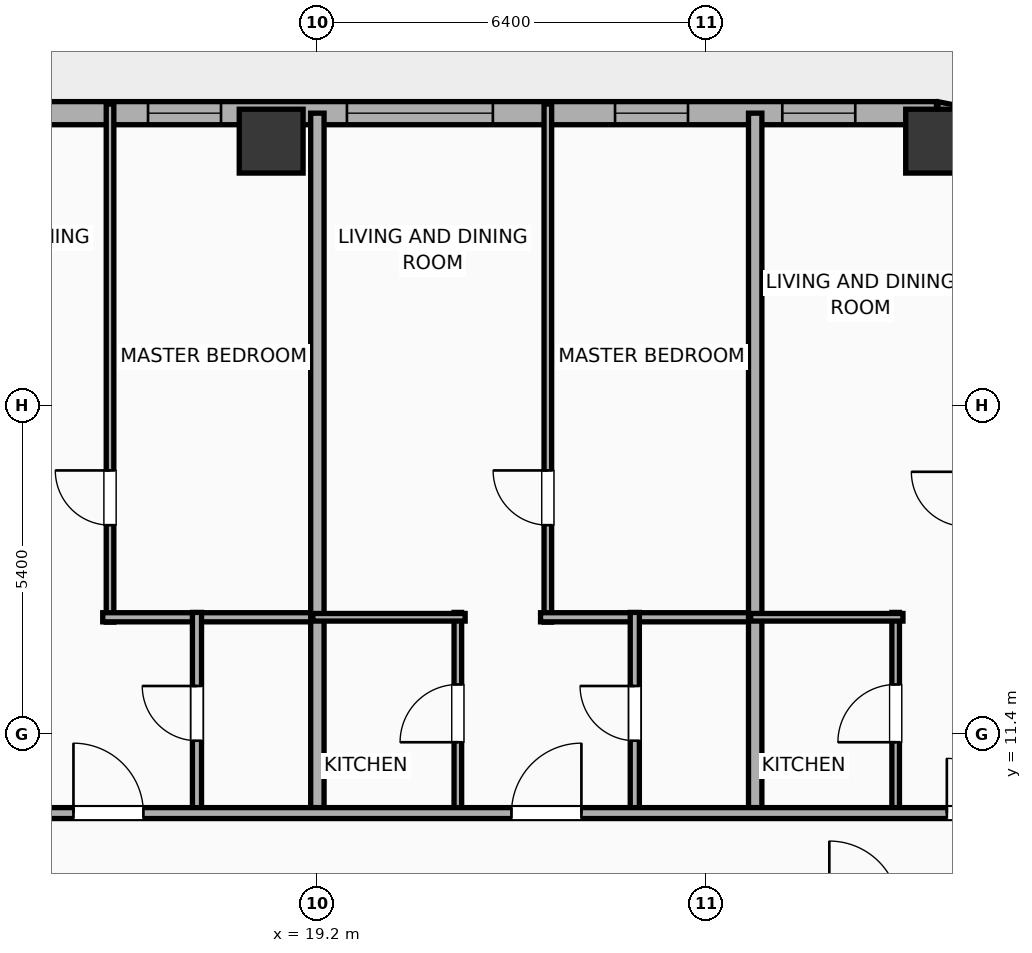
"""IFC4 building model, lengths in metres.
Left out: names, types, materials, properties, quantities, classifications, styles, units other than length and angle.
Written with IfcOpenShell. Run it as: python <this file> out.ifc"""

import sys

from ifc_helpers import new_model, si_unit, direction, frame, frame_2d, origin, origin_2d, place, context, subcontext, project, spatial, rectangle, hollow_rectangle, extrude, element, fill, save


model = new_model("IFC4")
c1 = context("Model", 3, precision=1e-05, world=origin(), true_north=direction((0.0, 1.0)))
c2 = subcontext(c1, "Body", "Model", "MODEL_VIEW")
j1 = project(units=[si_unit("LENGTHUNIT", "METRE"), si_unit("PLANEANGLEUNIT", "RADIAN")], contexts=[c1])
p1 = place(None, origin())
s1 = spatial("IfcSite", under=j1, at=p1, CompositionType="ELEMENT")
p2 = place(p1, origin())
s2 = spatial("IfcBuilding", under=s1, at=p2, CompositionType="ELEMENT")
p3 = place(p2, frame((0.0, 0.0, 113.1)))
s3 = spatial("IfcBuildingStorey", under=s2, at=p3, CompositionType="ELEMENT", Elevation=113.1)
for number, where, z_axis, x_axis in (
    (1, (29.4, 21.15, 0.0), (0.0, 0.0, 1.0), (1.0, 0.0, 0.0)),
    (2, (18.44, 21.15, 0.0), (0.0, 0.0, 1.0), (1.0, 0.0, 0.0)),
):
    element("IfcColumn", number, at=place(p3, frame(where, z_axis=z_axis, x_axis=x_axis)), inside=s3, PredefinedType="COLUMN", context=c2, shape_type="SweptSolid", body=[
        extrude(hollow_rectangle(XDim=1.05, YDim=1.05, WallThickness=0.036, at=origin_2d()), origin(), (0.0, 0.0, 1.0), 3.9),
    ])
p4 = place(p3, frame((-25.381, 21.61, 0.0), z_axis=(0.0, 0.0, 1.0), x_axis=(1.0, 0.0, 0.0)))
e3 = element("IfcWall", 3, at=p4, inside=s3, PredefinedType="ELEMENTEDWALL", context=c2, shape_type="SweptSolid", body=[
    extrude(rectangle(XDim=54.763, YDim=0.38, at=frame_2d((27.381, 0.0))), origin(), (0.0, 0.0, 1.0), 3.65),
])
p5 = place(p4, frame((5.645, 0.0, 0.75)))
e4 = element("IfcOpeningElement", 4, at=p5, cuts=e3, PredefinedType="OPENING", context=c2, shape_type="SweptSolid", body=[
    extrude(rectangle(XDim=2.4, YDim=2.1, at=frame_2d((1.2, 1.05))), frame((0.0, 0.2, 0.0), z_axis=(0.0, -1.0, 0.0), x_axis=(1.0, 0.0, 0.0)), (0.0, 0.0, 1.0), 0.4),
])
p6 = place(p4, frame((34.677, 0.0, 0.75)))
e5 = element("IfcOpeningElement", 5, at=p6, cuts=e3, PredefinedType="OPENING", context=c2, shape_type="SweptSolid", body=[
    extrude(rectangle(XDim=2.4, YDim=2.1, at=frame_2d((1.2, 1.05))), frame((0.0, 0.2, 0.0), z_axis=(0.0, -1.0, 0.0), x_axis=(1.0, 0.0, 0.0)), (0.0, 0.0, 1.0), 0.4),
])
p7 = place(p4, frame((45.067, 0.0, 0.75)))
e6 = element("IfcOpeningElement", 6, at=p7, cuts=e3, PredefinedType="OPENING", context=c2, shape_type="SweptSolid", body=[
    extrude(rectangle(XDim=2.4, YDim=2.1, at=frame_2d((1.2, 1.05))), frame((0.0, 0.2, 0.0), z_axis=(0.0, -1.0, 0.0), x_axis=(1.0, 0.0, 0.0)), (0.0, 0.0, 1.0), 0.4),
])
p8 = place(p4, frame((2.938, 0.0, 0.75)))
e7 = element("IfcOpeningElement", 7, at=p8, cuts=e3, PredefinedType="OPENING", context=c2, shape_type="SweptSolid", body=[
    extrude(rectangle(XDim=1.2, YDim=2.05, at=frame_2d((0.6, 1.025))), frame((0.0, 0.2, 0.0), z_axis=(0.0, -1.0, 0.0), x_axis=(1.0, 0.0, 0.0)), (0.0, 0.0, 1.0), 0.4),
])
p9 = place(p4, frame((8.916, 0.0, 0.75)))
e8 = element("IfcOpeningElement", 8, at=p9, cuts=e3, PredefinedType="OPENING", context=c2, shape_type="SweptSolid", body=[
    extrude(rectangle(XDim=1.2, YDim=2.05, at=frame_2d((0.6, 1.025))), frame((0.0, 0.2, 0.0), z_axis=(0.0, -1.0, 0.0), x_axis=(1.0, 0.0, 0.0)), (0.0, 0.0, 1.0), 0.4),
])
p10 = place(p4, frame((13.476, 0.0, 0.75)))
e9 = element("IfcOpeningElement", 9, at=p10, cuts=e3, PredefinedType="OPENING", context=c2, shape_type="SweptSolid", body=[
    extrude(rectangle(XDim=1.2, YDim=2.05, at=frame_2d((0.6, 1.025))), frame((0.0, 0.2, 0.0), z_axis=(0.0, -1.0, 0.0), x_axis=(1.0, 0.0, 0.0)), (0.0, 0.0, 1.0), 0.4),
])
p11 = place(p4, frame((17.076, 0.0, 0.75)))
e10 = element("IfcOpeningElement", 10, at=p11, cuts=e3, PredefinedType="OPENING", context=c2, shape_type="SweptSolid", body=[
    extrude(rectangle(XDim=1.2, YDim=2.05, at=frame_2d((0.6, 1.025))), frame((0.0, 0.2, 0.0), z_axis=(0.0, -1.0, 0.0), x_axis=(1.0, 0.0, 0.0)), (0.0, 0.0, 1.0), 0.4),
])
p12 = place(p4, frame((19.956, 0.0, 0.75)))
e11 = element("IfcOpeningElement", 11, at=p12, cuts=e3, PredefinedType="OPENING", context=c2, shape_type="SweptSolid", body=[
    extrude(rectangle(XDim=1.2, YDim=2.05, at=frame_2d((0.6, 1.025))), frame((0.0, 0.2, 0.0), z_axis=(0.0, -1.0, 0.0), x_axis=(1.0, 0.0, 0.0)), (0.0, 0.0, 1.0), 0.4),
])
p13 = place(p4, frame((24.276, 0.0, 0.75)))
e12 = element("IfcOpeningElement", 12, at=p13, cuts=e3, PredefinedType="OPENING", context=c2, shape_type="SweptSolid", body=[
    extrude(rectangle(XDim=1.2, YDim=2.05, at=frame_2d((0.6, 1.025))), frame((0.0, 0.2, 0.0), z_axis=(0.0, -1.0, 0.0), x_axis=(1.0, 0.0, 0.0)), (0.0, 0.0, 1.0), 0.4),
])
p14 = place(p4, frame((27.876, 0.0, 0.75)))
e13 = element("IfcOpeningElement", 13, at=p14, cuts=e3, PredefinedType="OPENING", context=c2, shape_type="SweptSolid", body=[
    extrude(rectangle(XDim=1.2, YDim=2.05, at=frame_2d((0.6, 1.025))), frame((0.0, 0.2, 0.0), z_axis=(0.0, -1.0, 0.0), x_axis=(1.0, 0.0, 0.0)), (0.0, 0.0, 1.0), 0.4),
])
p15 = place(p4, frame((30.876, 0.0, 0.75)))
e14 = element("IfcOpeningElement", 14, at=p15, cuts=e3, PredefinedType="OPENING", context=c2, shape_type="SweptSolid", body=[
    extrude(rectangle(XDim=1.2, YDim=2.05, at=frame_2d((0.6, 1.025))), frame((0.0, 0.2, 0.0), z_axis=(0.0, -1.0, 0.0), x_axis=(1.0, 0.0, 0.0)), (0.0, 0.0, 1.0), 0.4),
])
p16 = place(p4, frame((38.676, 0.0, 0.75)))
e15 = element("IfcOpeningElement", 15, at=p16, cuts=e3, PredefinedType="OPENING", context=c2, shape_type="SweptSolid", body=[
    extrude(rectangle(XDim=1.2, YDim=2.05, at=frame_2d((0.6, 1.025))), frame((0.0, 0.2, 0.0), z_axis=(0.0, -1.0, 0.0), x_axis=(1.0, 0.0, 0.0)), (0.0, 0.0, 1.0), 0.4),
])
p17 = place(p4, frame((41.796, 0.0, 0.75)))
e16 = element("IfcOpeningElement", 16, at=p17, cuts=e3, PredefinedType="OPENING", context=c2, shape_type="SweptSolid", body=[
    extrude(rectangle(XDim=1.2, YDim=2.05, at=frame_2d((0.6, 1.025))), frame((0.0, 0.2, 0.0), z_axis=(0.0, -1.0, 0.0), x_axis=(1.0, 0.0, 0.0)), (0.0, 0.0, 1.0), 0.4),
])
p18 = place(p4, frame((49.476, 0.0, 0.75)))
e17 = element("IfcOpeningElement", 17, at=p18, cuts=e3, PredefinedType="OPENING", context=c2, shape_type="SweptSolid", body=[
    extrude(rectangle(XDim=1.2, YDim=2.05, at=frame_2d((0.6, 1.025))), frame((0.0, 0.2, 0.0), z_axis=(0.0, -1.0, 0.0), x_axis=(1.0, 0.0, 0.0)), (0.0, 0.0, 1.0), 0.4),
])
p19 = place(p4, frame((52.227, 0.0, 0.75)))
e18 = element("IfcOpeningElement", 18, at=p19, cuts=e3, PredefinedType="OPENING", context=c2, shape_type="SweptSolid", body=[
    extrude(rectangle(XDim=1.2, YDim=2.05, at=frame_2d((0.6, 1.025))), frame((0.0, 0.2, 0.0), z_axis=(0.0, -1.0, 0.0), x_axis=(1.0, 0.0, 0.0)), (0.0, 0.0, 1.0), 0.4),
])
p20 = place(p3, frame((29.381, 21.61, 0.0), z_axis=(0.0, 0.0, 1.0), x_axis=(0.980755066645, -0.195242155415, 0.0)))
e19 = element("IfcWall", 19, at=p20, inside=s3, PredefinedType="ELEMENTEDWALL", context=c2, shape_type="SweptSolid", body=[
    extrude(rectangle(XDim=1.504, YDim=0.38, at=frame_2d((0.752, 0.0))), origin(), (0.0, 0.0, 1.0), 3.65),
])
p21 = place(p20, frame((0.732, 0.0, 0.75)))
e20 = element("IfcOpeningElement", 20, at=p21, cuts=e19, PredefinedType="OPENING", context=c2, shape_type="SweptSolid", body=[
    extrude(rectangle(XDim=0.52, YDim=2.05, at=frame_2d((0.26, 1.025))), frame((0.0, 0.2, 0.0), z_axis=(0.0, -1.0, 0.0), x_axis=(1.0, 0.0, 0.0)), (0.0, 0.0, 1.0), 0.4),
])
p22 = place(p3, frame((15.79, 13.24, 0.0), z_axis=(0.0, 0.0, 1.0), x_axis=(0.0, 1.0, 0.0)))
e21 = element("IfcWall", 21, at=p22, inside=s3, PredefinedType="PARTITIONING", context=c2, shape_type="SweptSolid", body=[
    extrude(rectangle(XDim=8.52, YDim=0.125, at=frame_2d((4.26, 0.0))), origin(), (0.0, 0.0, 1.0), 3.65),
])
p23 = place(p22, frame((1.595, 0.0, 0.0)))
e22 = element("IfcOpeningElement", 22, at=p23, cuts=e21, PredefinedType="OPENING", context=c2, shape_type="SweptSolid", body=[
    extrude(rectangle(XDim=0.9, YDim=2.05, at=frame_2d((0.45, 1.025))), frame((0.0, 0.073, 0.0), z_axis=(0.0, -1.0, 0.0), x_axis=(1.0, 0.0, 0.0)), (0.0, 0.0, 1.0), 0.145),
])
p24 = place(p3, frame((15.67, 13.32, 0.0), z_axis=(0.0, 0.0, 1.0), x_axis=(1.0, 0.0, 0.0)))
e23 = element("IfcWall", 23, at=p24, inside=s3, PredefinedType="PLUMBINGWALL", context=c2, shape_type="SweptSolid", body=[
    extrude(rectangle(XDim=3.605, YDim=0.15, at=frame_2d((1.802, 0.0))), origin(), (0.0, 0.0, 1.0), 3.65),
])
p25 = place(p3, frame((17.22, 10.08, 0.0), z_axis=(0.0, 0.0, 1.0), x_axis=(0.0, 1.0, 0.0)))
e24 = element("IfcWall", 24, at=p25, inside=s3, PredefinedType="PLUMBINGWALL", context=c2, shape_type="SweptSolid", body=[
    extrude(rectangle(XDim=3.32, YDim=0.15, at=frame_2d((1.66, 0.0))), origin(), (0.0, 0.0, 1.0), 3.65),
])
p26 = place(p25, frame((1.21, 0.0, 0.0)))
e25 = element("IfcOpeningElement", 25, at=p26, cuts=e24, PredefinedType="OPENING", context=c2, shape_type="SweptSolid", body=[
    extrude(rectangle(XDim=0.9, YDim=2.05, at=frame_2d((0.45, 1.025))), frame((0.0, 0.085, 0.0), z_axis=(0.0, -1.0, 0.0), x_axis=(1.0, 0.0, 0.0)), (0.0, 0.0, 1.0), 0.17),
])
p27 = place(p3, frame((19.2, 10.02, 0.0), z_axis=(0.0, 0.0, 1.0), x_axis=(0.0, 1.0, 0.0)))
e26 = element("IfcWall", 26, at=p27, inside=s3, PredefinedType="PARTITIONING", context=c2, shape_type="SweptSolid", body=[
    extrude(rectangle(XDim=11.59, YDim=0.22, at=frame_2d((5.795, 0.0))), origin(), (0.0, 0.0, 1.0), 3.04),
])
p28 = place(p3, frame((22.99, 13.24, 0.0), z_axis=(0.0, 0.0, 1.0), x_axis=(0.0, 1.0, 0.0)))
e27 = element("IfcWall", 27, at=p28, inside=s3, PredefinedType="PARTITIONING", context=c2, shape_type="SweptSolid", body=[
    extrude(rectangle(XDim=8.52, YDim=0.125, at=frame_2d((4.26, 0.0))), origin(), (0.0, 0.0, 1.0), 3.65),
])
p29 = place(p28, frame((1.595, 0.0, 0.0)))
e28 = element("IfcOpeningElement", 28, at=p29, cuts=e27, PredefinedType="OPENING", context=c2, shape_type="SweptSolid", body=[
    extrude(rectangle(XDim=0.9, YDim=2.05, at=frame_2d((0.45, 1.025))), frame((0.0, 0.073, 0.0), z_axis=(0.0, -1.0, 0.0), x_axis=(1.0, 0.0, 0.0)), (0.0, 0.0, 1.0), 0.145),
])
p30 = place(p3, frame((22.87, 13.32, 0.0), z_axis=(0.0, 0.0, 1.0), x_axis=(1.0, 0.0, 0.0)))
e29 = element("IfcWall", 29, at=p30, inside=s3, PredefinedType="PLUMBINGWALL", context=c2, shape_type="SweptSolid", body=[
    extrude(rectangle(XDim=3.605, YDim=0.15, at=frame_2d((1.802, 0.0))), origin(), (0.0, 0.0, 1.0), 3.65),
])
p31 = place(p3, frame((21.51, 10.08, 0.0), z_axis=(0.0, 0.0, 1.0), x_axis=(0.0, 1.0, 0.0)))
e30 = element("IfcWall", 30, at=p31, inside=s3, PredefinedType="PARTITIONING", context=c2, shape_type="SweptSolid", body=[
    extrude(rectangle(XDim=3.32, YDim=0.125, at=frame_2d((1.66, 0.0))), origin(), (0.0, 0.0, 1.0), 3.65),
])
p32 = place(p31, frame((1.185, 0.0, 0.0)))
e31 = element("IfcOpeningElement", 31, at=p32, cuts=e30, PredefinedType="OPENING", context=c2, shape_type="SweptSolid", body=[
    extrude(rectangle(XDim=0.95, YDim=2.05, at=frame_2d((0.475, 1.025))), frame((0.0, 0.073, 0.0), z_axis=(0.0, -1.0, 0.0), x_axis=(1.0, 0.0, 0.0)), (0.0, 0.0, 1.0), 0.145),
])
p33 = place(p3, frame((19.125, 13.32, 0.0), z_axis=(0.0, 0.0, 1.0), x_axis=(1.0, 0.0, 0.0)))
e32 = element("IfcWall", 32, at=p33, inside=s3, PredefinedType="PARTITIONING", context=c2, shape_type="SweptSolid", body=[
    extrude(rectangle(XDim=2.505, YDim=0.125, at=frame_2d((1.252, 0.0))), origin(), (0.0, 0.0, 1.0), 3.65),
])
p34 = place(p3, frame((24.42, 10.08, 0.0), z_axis=(0.0, 0.0, 1.0), x_axis=(0.0, 1.0, 0.0)))
e33 = element("IfcWall", 33, at=p34, inside=s3, PredefinedType="PLUMBINGWALL", context=c2, shape_type="SweptSolid", body=[
    extrude(rectangle(XDim=3.32, YDim=0.15, at=frame_2d((1.66, 0.0))), origin(), (0.0, 0.0, 1.0), 3.65),
])
p35 = place(p34, frame((1.21, 0.0, 0.0)))
e34 = element("IfcOpeningElement", 34, at=p35, cuts=e33, PredefinedType="OPENING", context=c2, shape_type="SweptSolid", body=[
    extrude(rectangle(XDim=0.9, YDim=2.05, at=frame_2d((0.45, 1.025))), frame((0.0, 0.085, 0.0), z_axis=(0.0, -1.0, 0.0), x_axis=(1.0, 0.0, 0.0)), (0.0, 0.0, 1.0), 0.17),
])
p36 = place(p3, frame((26.4, 10.02, 0.0), z_axis=(0.0, 0.0, 1.0), x_axis=(0.0, 1.0, 0.0)))
e35 = element("IfcWall", 35, at=p36, inside=s3, PredefinedType="PARTITIONING", context=c2, shape_type="SweptSolid", body=[
    extrude(rectangle(XDim=11.59, YDim=0.22, at=frame_2d((5.795, 0.0))), origin(), (0.0, 0.0, 1.0), 3.65),
])
p37 = place(p3, frame((28.71, 10.08, 0.0), z_axis=(0.0, 0.0, 1.0), x_axis=(0.0, 1.0, 0.0)))
e36 = element("IfcWall", 36, at=p37, inside=s3, PredefinedType="PARTITIONING", context=c2, shape_type="SweptSolid", body=[
    extrude(rectangle(XDim=3.32, YDim=0.125, at=frame_2d((1.66, 0.0))), origin(), (0.0, 0.0, 1.0), 3.65),
])
p38 = place(p37, frame((1.185, 0.0, 0.0)))
e37 = element("IfcOpeningElement", 37, at=p38, cuts=e36, PredefinedType="OPENING", context=c2, shape_type="SweptSolid", body=[
    extrude(rectangle(XDim=0.95, YDim=2.05, at=frame_2d((0.475, 1.025))), frame((0.0, 0.073, 0.0), z_axis=(0.0, -1.0, 0.0), x_axis=(1.0, 0.0, 0.0)), (0.0, 0.0, 1.0), 0.145),
])
p39 = place(p3, frame((26.325, 13.32, 0.0), z_axis=(0.0, 0.0, 1.0), x_axis=(1.0, 0.0, 0.0)))
e38 = element("IfcWall", 38, at=p39, inside=s3, PredefinedType="PARTITIONING", context=c2, shape_type="SweptSolid", body=[
    extrude(rectangle(XDim=2.505, YDim=0.125, at=frame_2d((1.252, 0.0))), origin(), (0.0, 0.0, 1.0), 3.65),
])
p40 = place(p3, frame((-29.21, 10.1, 0.0), z_axis=(0.0, 0.0, 1.0), x_axis=(1.0, 0.0, 0.0)))
e39 = element("IfcWall", 39, at=p40, inside=s3, PredefinedType="PARTITIONING", context=c2, shape_type="SweptSolid", body=[
    extrude(rectangle(XDim=62.42, YDim=0.18, at=frame_2d((31.21, 0.0))), origin(), (0.0, 0.0, 1.0), 3.65),
])
p41 = place(p40, frame((2.74, 0.0, 0.0)))
e40 = element("IfcOpeningElement", 40, at=p41, cuts=e39, PredefinedType="OPENING", context=c2, shape_type="SweptSolid", body=[
    extrude(rectangle(XDim=0.9, YDim=2.05, at=frame_2d((0.45, 1.025))), frame((0.0, 0.1, 0.0), z_axis=(0.0, -1.0, 0.0), x_axis=(1.0, 0.0, 0.0)), (0.0, 0.0, 1.0), 0.2),
])
p42 = place(p40, frame((9.868, 0.0, 0.0)))
e41 = element("IfcOpeningElement", 41, at=p42, cuts=e39, PredefinedType="OPENING", context=c2, shape_type="SweptSolid", body=[
    extrude(rectangle(XDim=1.15, YDim=2.05, at=frame_2d((0.575, 1.025))), frame((0.0, 0.1, 0.0), z_axis=(0.0, -1.0, 0.0), x_axis=(1.0, 0.0, 0.0)), (0.0, 0.0, 1.0), 0.2),
])
p43 = place(p40, frame((15.598, 0.0, 0.0)))
e42 = element("IfcOpeningElement", 42, at=p43, cuts=e39, PredefinedType="OPENING", context=c2, shape_type="SweptSolid", body=[
    extrude(rectangle(XDim=1.15, YDim=2.05, at=frame_2d((0.575, 1.025))), frame((0.0, 0.1, 0.0), z_axis=(0.0, -1.0, 0.0), x_axis=(1.0, 0.0, 0.0)), (0.0, 0.0, 1.0), 0.2),
])
p44 = place(p40, frame((22.801, 0.0, 0.0)))
e43 = element("IfcOpeningElement", 43, at=p44, cuts=e39, PredefinedType="OPENING", context=c2, shape_type="SweptSolid", body=[
    extrude(rectangle(XDim=1.15, YDim=2.05, at=frame_2d((0.575, 1.025))), frame((0.0, 0.1, 0.0), z_axis=(0.0, -1.0, 0.0), x_axis=(1.0, 0.0, 0.0)), (0.0, 0.0, 1.0), 0.2),
])
p45 = place(p40, frame((29.998, 0.0, 0.0)))
e44 = element("IfcOpeningElement", 44, at=p45, cuts=e39, PredefinedType="OPENING", context=c2, shape_type="SweptSolid", body=[
    extrude(rectangle(XDim=1.15, YDim=2.05, at=frame_2d((0.575, 1.025))), frame((0.0, 0.1, 0.0), z_axis=(0.0, -1.0, 0.0), x_axis=(1.0, 0.0, 0.0)), (0.0, 0.0, 1.0), 0.2),
])
p46 = place(p40, frame((37.202, 0.0, 0.0)))
e45 = element("IfcOpeningElement", 45, at=p46, cuts=e39, PredefinedType="OPENING", context=c2, shape_type="SweptSolid", body=[
    extrude(rectangle(XDim=1.15, YDim=2.05, at=frame_2d((0.575, 1.025))), frame((0.0, 0.1, 0.0), z_axis=(0.0, -1.0, 0.0), x_axis=(1.0, 0.0, 0.0)), (0.0, 0.0, 1.0), 0.2),
])
p47 = place(p40, frame((44.399, 0.0, 0.0)))
e46 = element("IfcOpeningElement", 46, at=p47, cuts=e39, PredefinedType="OPENING", context=c2, shape_type="SweptSolid", body=[
    extrude(rectangle(XDim=1.15, YDim=2.05, at=frame_2d((0.575, 1.025))), frame((0.0, 0.1, 0.0), z_axis=(0.0, -1.0, 0.0), x_axis=(1.0, 0.0, 0.0)), (0.0, 0.0, 1.0), 0.2),
])
p48 = place(p40, frame((51.602, 0.0, 0.0)))
e47 = element("IfcOpeningElement", 47, at=p48, cuts=e39, PredefinedType="OPENING", context=c2, shape_type="SweptSolid", body=[
    extrude(rectangle(XDim=1.15, YDim=2.05, at=frame_2d((0.575, 1.025))), frame((0.0, 0.1, 0.0), z_axis=(0.0, -1.0, 0.0), x_axis=(1.0, 0.0, 0.0)), (0.0, 0.0, 1.0), 0.2),
])
p49 = place(p40, frame((58.762, 0.0, 0.0)))
e48 = element("IfcOpeningElement", 48, at=p49, cuts=e39, PredefinedType="OPENING", context=c2, shape_type="SweptSolid", body=[
    extrude(rectangle(XDim=0.9, YDim=2.05, at=frame_2d((0.45, 1.025))), frame((0.0, 0.1, 0.0), z_axis=(0.0, -1.0, 0.0), x_axis=(1.0, 0.0, 0.0)), (0.0, 0.0, 1.0), 0.2),
])
p50 = place(p7, origin())
e49 = element("IfcWindow", 49, at=p50, inside=s3, PartitioningType="SINGLE_PANEL", PredefinedType="WINDOW", context=c2, shape_type="SweptSolid", body=[
    extrude(rectangle(XDim=2.4, YDim=2.1, at=frame_2d((1.2, 1.05))), frame((0.0, 0.03, 0.0), z_axis=(0.0, -1.0, 0.0), x_axis=(1.0, 0.0, 0.0)), (0.0, 0.0, 1.0), 0.06),
])
fill(e6, e49)
p51 = place(p17, origin())
e50 = element("IfcWindow", 50, at=p51, inside=s3, PartitioningType="SINGLE_PANEL", PredefinedType="WINDOW", context=c2, shape_type="SweptSolid", body=[
    extrude(rectangle(XDim=1.2, YDim=2.05, at=frame_2d((0.6, 1.025))), frame((0.0, 0.03, 0.0), z_axis=(0.0, -1.0, 0.0), x_axis=(1.0, 0.0, 0.0)), (0.0, 0.0, 1.0), 0.06),
])
fill(e16, e50)
p52 = place(p18, origin())
e51 = element("IfcWindow", 51, at=p52, inside=s3, PartitioningType="SINGLE_PANEL", PredefinedType="WINDOW", context=c2, shape_type="SweptSolid", body=[
    extrude(rectangle(XDim=1.2, YDim=2.05, at=frame_2d((0.6, 1.025))), frame((0.0, 0.03, 0.0), z_axis=(0.0, -1.0, 0.0), x_axis=(1.0, 0.0, 0.0)), (0.0, 0.0, 1.0), 0.06),
])
fill(e17, e51)
p53 = place(p19, origin())
e52 = element("IfcWindow", 52, at=p53, inside=s3, PartitioningType="SINGLE_PANEL", PredefinedType="WINDOW", context=c2, shape_type="SweptSolid", body=[
    extrude(rectangle(XDim=1.2, YDim=2.05, at=frame_2d((0.6, 1.025))), frame((0.0, 0.03, 0.0), z_axis=(0.0, -1.0, 0.0), x_axis=(1.0, 0.0, 0.0)), (0.0, 0.0, 1.0), 0.06),
])
fill(e18, e52)
p54 = place(p23, origin())
e53 = element("IfcDoor", 53, at=p54, inside=s3, OperationType="SINGLE_SWING_RIGHT", PredefinedType="DOOR", context=c2, shape_type="SweptSolid", body=[
    extrude(rectangle(XDim=0.9, YDim=2.05, at=frame_2d((0.45, 1.025))), frame((0.0, 0.025, 0.0), z_axis=(0.0, -1.0, 0.0), x_axis=(1.0, 0.0, 0.0)), (0.0, 0.0, 1.0), 0.05),
])
fill(e22, e53)
p55 = place(p26, origin())
e54 = element("IfcDoor", 54, at=p55, inside=s3, OperationType="SINGLE_SWING_RIGHT", PredefinedType="DOOR", context=c2, shape_type="SweptSolid", body=[
    extrude(rectangle(XDim=0.9, YDim=2.05, at=frame_2d((0.45, 1.025))), frame((0.0, 0.025, 0.0), z_axis=(0.0, -1.0, 0.0), x_axis=(1.0, 0.0, 0.0)), (0.0, 0.0, 1.0), 0.05),
])
fill(e25, e54)
p56 = place(p29, origin())
e55 = element("IfcDoor", 55, at=p56, inside=s3, OperationType="SINGLE_SWING_RIGHT", PredefinedType="DOOR", context=c2, shape_type="SweptSolid", body=[
    extrude(rectangle(XDim=0.9, YDim=2.05, at=frame_2d((0.45, 1.025))), frame((0.0, 0.025, 0.0), z_axis=(0.0, -1.0, 0.0), x_axis=(1.0, 0.0, 0.0)), (0.0, 0.0, 1.0), 0.05),
])
fill(e28, e55)
p57 = place(p32, origin())
e56 = element("IfcDoor", 56, at=p57, inside=s3, OperationType="SINGLE_SWING_LEFT", PredefinedType="DOOR", context=c2, shape_type="SweptSolid", body=[
    extrude(rectangle(XDim=0.95, YDim=2.05, at=frame_2d((0.475, 1.025))), frame((0.0, 0.025, 0.0), z_axis=(0.0, -1.0, 0.0), x_axis=(1.0, 0.0, 0.0)), (0.0, 0.0, 1.0), 0.05),
])
fill(e31, e56)
p58 = place(p35, origin())
e57 = element("IfcDoor", 57, at=p58, inside=s3, OperationType="SINGLE_SWING_RIGHT", PredefinedType="DOOR", context=c2, shape_type="SweptSolid", body=[
    extrude(rectangle(XDim=0.9, YDim=2.05, at=frame_2d((0.45, 1.025))), frame((0.0, 0.025, 0.0), z_axis=(0.0, -1.0, 0.0), x_axis=(1.0, 0.0, 0.0)), (0.0, 0.0, 1.0), 0.05),
])
fill(e34, e57)
p59 = place(p38, origin())
e58 = element("IfcDoor", 58, at=p59, inside=s3, OperationType="SINGLE_SWING_LEFT", PredefinedType="DOOR", context=c2, shape_type="SweptSolid", body=[
    extrude(rectangle(XDim=0.95, YDim=2.05, at=frame_2d((0.475, 1.025))), frame((0.0, 0.025, 0.0), z_axis=(0.0, -1.0, 0.0), x_axis=(1.0, 0.0, 0.0)), (0.0, 0.0, 1.0), 0.05),
])
fill(e37, e58)
p60 = place(p47, origin())
e59 = element("IfcDoor", 59, at=p60, inside=s3, OperationType="SINGLE_SWING_LEFT", PredefinedType="DOOR", context=c2, shape_type="SweptSolid", body=[
    extrude(rectangle(XDim=1.15, YDim=2.05, at=frame_2d((0.575, 1.025))), frame((0.0, 0.025, 0.0), z_axis=(0.0, -1.0, 0.0), x_axis=(1.0, 0.0, 0.0)), (0.0, 0.0, 1.0), 0.05),
])
fill(e46, e59)
p61 = place(p48, origin())
e60 = element("IfcDoor", 60, at=p61, inside=s3, OperationType="SINGLE_SWING_RIGHT", PredefinedType="DOOR", context=c2, shape_type="SweptSolid", body=[
    extrude(rectangle(XDim=1.15, YDim=2.05, at=frame_2d((0.575, 1.025))), frame((0.0, 0.025, 0.0), z_axis=(0.0, -1.0, 0.0), x_axis=(1.0, 0.0, 0.0)), (0.0, 0.0, 1.0), 0.05),
])
fill(e47, e60)
p62 = place(p49, origin())
e61 = element("IfcDoor", 61, at=p62, inside=s3, OperationType="SINGLE_SWING_LEFT", PredefinedType="DOOR", context=c2, shape_type="SweptSolid", body=[
    extrude(rectangle(XDim=0.9, YDim=2.05, at=frame_2d((0.45, 1.025))), frame((0.0, 0.025, 0.0), z_axis=(0.0, -1.0, 0.0), x_axis=(1.0, 0.0, 0.0)), (0.0, 0.0, 1.0), 0.05),
])
fill(e48, e61)
save(model, sys.argv[1])
